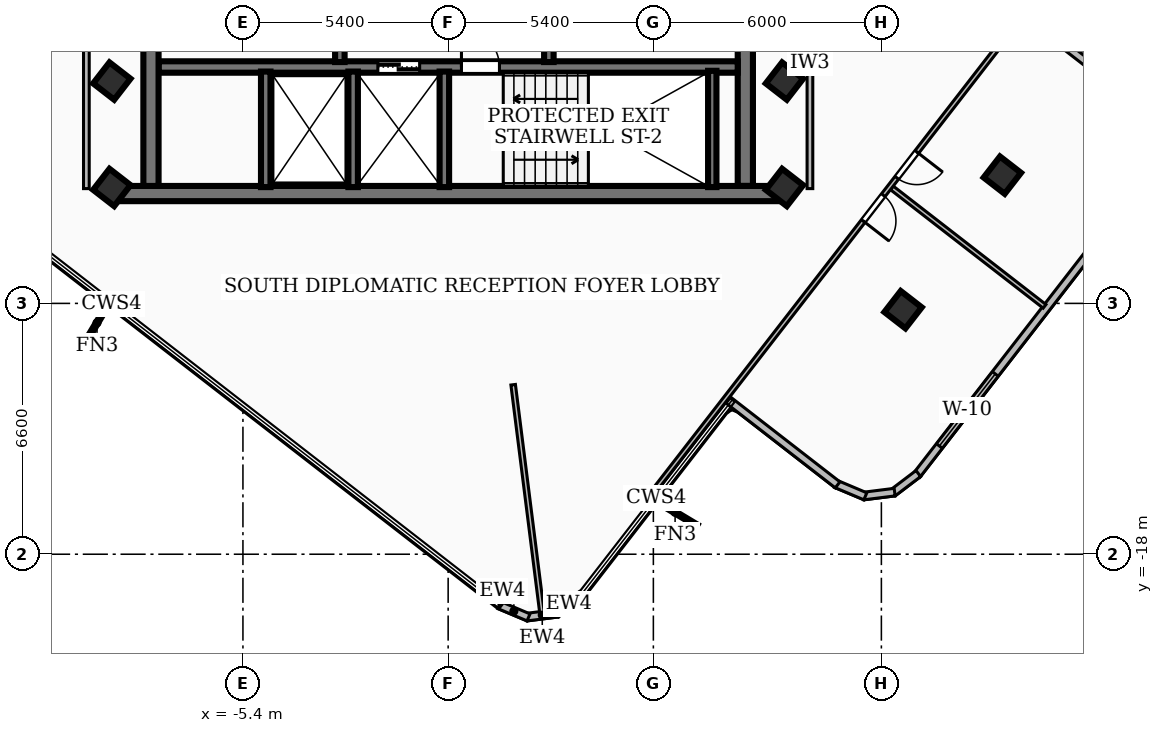
"""IFC4 building model, lengths in metres.
Left out: names, types, materials, properties, quantities, classifications, styles, units other than length and angle.
Written with IfcOpenShell. Run it as: python <this file> out.ifc"""

import sys

from ifc_helpers import new_model, si_unit, direction, frame, frame_2d, origin, origin_2d, place, context, subcontext, project, spatial, rectangle, extrude, element, fill, save


model = new_model("IFC4")
c1 = context("Model", 3, precision=1e-05, world=origin(), true_north=direction((0.0, 1.0)))
c2 = subcontext(c1, "Body", "Model", "MODEL_VIEW")
j1 = project(units=[si_unit("LENGTHUNIT", "METRE"), si_unit("PLANEANGLEUNIT", "RADIAN")], contexts=[c1])
p1 = place(None, origin())
s1 = spatial("IfcSite", under=j1, at=p1, CompositionType="ELEMENT")
p2 = place(p1, origin())
s2 = spatial("IfcBuilding", under=s1, at=p2, CompositionType="ELEMENT")
p3 = place(p2, frame((0.0, 0.0, 257.76)))
s3 = spatial("IfcBuildingStorey", under=s2, at=p3, CompositionType="ELEMENT", Elevation=257.76)
p4 = place(p3, frame((8.78, -8.51, 0.0), z_axis=(0.0, 0.0, 1.0), x_axis=(-1.0, 0.0, 0.0)))
e1 = element("IfcWall", 1, at=p4, inside=s3, PredefinedType="SHEAR", context=c2, shape_type="SweptSolid", body=[
    extrude(rectangle(XDim=17.56, YDim=0.4, at=frame_2d((8.78, 0.0))), origin(), (0.0, 0.0, 1.0), 3.16),
])
for number, where, z_axis, x_axis in (
    (2, (-7.82, -8.31, 0.0), (0.0, 0.0, 1.0), (0.0, 1.0, 0.0)),
    (3, (7.82, -1.95, 0.0), (0.0, 0.0, 1.0), (0.0, -1.0, 0.0)),
):
    element("IfcWall", number, at=place(p3, frame(where, z_axis=z_axis, x_axis=x_axis)), inside=s3, PredefinedType="SHEAR", context=c2, shape_type="SweptSolid", body=[
        extrude(rectangle(XDim=6.36, YDim=0.4, at=frame_2d((3.18, 0.0))), origin(), (0.0, 0.0, 1.0), 3.16),
    ])
p5 = place(p3, frame((-7.62, -5.18, 0.0), z_axis=(0.0, 0.0, 1.0), x_axis=(1.0, 0.0, 0.0)))
e4 = element("IfcWall", 4, at=p5, inside=s3, PredefinedType="SOLIDWALL", context=c2, shape_type="SweptSolid", body=[
    extrude(rectangle(XDim=15.24, YDim=0.3, at=frame_2d((7.62, 0.0))), origin(), (0.0, 0.0, 1.0), 3.16),
])
p6 = place(p5, frame((5.77, 0.0, 0.0)))
e5 = element("IfcOpeningElement", 5, at=p6, cuts=e4, PredefinedType="OPENING", context=c2, shape_type="SweptSolid", body=[
    extrude(rectangle(XDim=1.1, YDim=2.15, at=frame_2d((0.55, 1.075))), frame((0.0, 0.16, 0.0), z_axis=(0.0, -1.0, 0.0), x_axis=(1.0, 0.0, 0.0)), (0.0, 0.0, 1.0), 0.32),
])
p7 = place(p5, frame((7.97, 0.0, 0.0)))
e6 = element("IfcOpeningElement", 6, at=p7, cuts=e4, PredefinedType="OPENING", context=c2, shape_type="SweptSolid", body=[
    extrude(rectangle(XDim=1.0, YDim=2.1, at=frame_2d((0.5, 1.05))), frame((0.0, 0.16, 0.0), z_axis=(0.0, -1.0, 0.0), x_axis=(1.0, 0.0, 0.0)), (0.0, 0.0, 1.0), 0.32),
])
p8 = place(p3, frame((6.95, -8.34, 0.0), z_axis=(0.0, 0.0, 1.0), x_axis=(0.0, 1.0, 0.0)))
e7 = element("IfcWall", 7, at=p8, inside=s3, PredefinedType="SOLIDWALL", context=c2, shape_type="SweptSolid", body=[
    extrude(rectangle(XDim=3.06, YDim=0.22, at=frame_2d((1.53, 0.0))), origin(), (0.0, 0.0, 1.0), 3.16),
])
for number, where, z_axis, x_axis in (
    (8, (-0.1, -8.34, 0.0), (0.0, 0.0, 1.0), (0.0, 1.0, 0.0)),
    (9, (-2.5, -8.34, 0.0), (0.0, 0.0, 1.0), (0.0, 1.0, 0.0)),
    (10, (-4.8, -8.34, 0.0), (0.0, 0.0, 1.0), (0.0, 1.0, 0.0)),
):
    element("IfcWall", number, at=place(p3, frame(where, z_axis=z_axis, x_axis=x_axis)), inside=s3, PredefinedType="SOLIDWALL", context=c2, shape_type="SweptSolid", body=[
        extrude(rectangle(XDim=3.04, YDim=0.25, at=frame_2d((1.52, 0.0))), origin(), (0.0, 0.0, 1.0), 3.16),
    ])
for number, where, z_axis, x_axis in (
    (11, (-2.85, -5.05, 0.0), (0.0, 0.0, 1.0), (0.0, 1.0, 0.0)),
    (12, (2.65, -5.05, 0.0), (0.0, 0.0, 1.0), (0.0, 1.0, 0.0)),
):
    element("IfcWall", number, at=place(p3, frame(where, z_axis=z_axis, x_axis=x_axis)), inside=s3, PredefinedType="SOLIDWALL", context=c2, shape_type="SweptSolid", body=[
        extrude(rectangle(XDim=3.07, YDim=0.25, at=frame_2d((1.535, 0.0))), origin(), (0.0, 0.0, 1.0), 3.16),
    ])
for number, where, z_axis, x_axis in (
    (13, (-8.85, -5.55, 0.0), (0.0, 0.0, 1.0), (0.613, 0.79, 0.0)),
    (14, (8.85, -5.55, 0.0), (0.0, 0.0, 1.0), (0.613, 0.79, 0.0)),
    (15, (8.85, -8.35, 0.0), (0.0, 0.0, 1.0), (0.613, 0.79, 0.0)),
    (16, (-8.85, -8.35, 0.0), (0.0, 0.0, 1.0), (0.613, 0.79, 0.0)),
    (17, (11.971, -11.566, 0.0), (0.0, 0.0, 1.0), (0.613, 0.79, 0.0)),
    (18, (14.583, -8.026, 0.0), (0.0, 0.0, 1.0), (0.613, 0.79, 0.0)),
):
    element("IfcColumn", number, at=place(p3, frame(where, z_axis=z_axis, x_axis=x_axis)), inside=s3, PredefinedType="COLUMN", context=c2, shape_type="SweptSolid", body=[
        extrude(rectangle(XDim=0.7, YDim=0.7, at=origin_2d()), origin(), (0.0, 0.0, 1.0), 3.42),
    ])
p9 = place(p3, frame((3.509, -19.064, 0.0), z_axis=(0.0, 0.0, 1.0), x_axis=(-0.797053904317, -0.603908166539, 0.0)))
e19 = element("IfcWall", 19, at=p9, inside=s3, PredefinedType="SOLIDWALL", context=c2, shape_type="SweptSolid", body=[
    extrude(rectangle(XDim=0.838, YDim=0.2, at=frame_2d((0.419, 0.0))), origin(), (0.0, 0.0, 1.0), 3.16),
])
p10 = place(p3, frame((2.886, -19.552, 0.0), z_axis=(0.0, 0.0, 1.0), x_axis=(-0.992182038023, -0.124799052175, 0.0)))
e20 = element("IfcWall", 20, at=p10, inside=s3, PredefinedType="SOLIDWALL", context=c2, shape_type="SweptSolid", body=[
    extrude(rectangle(XDim=0.825, YDim=0.2, at=frame_2d((0.413, 0.0))), origin(), (0.0, 0.0, 1.0), 3.16),
])
p11 = place(p3, frame((2.115, -19.662, 0.0), z_axis=(0.0, 0.0, 1.0), x_axis=(-0.921569528133, 0.388213349612, 0.0)))
e21 = element("IfcWall", 21, at=p11, inside=s3, PredefinedType="SOLIDWALL", context=c2, shape_type="SweptSolid", body=[
    extrude(rectangle(XDim=0.838, YDim=0.2, at=frame_2d((0.419, 0.0))), origin(), (0.0, 0.0, 1.0), 3.16),
])
p12 = place(p3, frame((15.215, -3.829, 0.0), z_axis=(0.0, 0.0, 1.0), x_axis=(0.790311198889, -0.612705646221, 0.0)))
e22 = element("IfcWall", 22, at=p12, inside=s3, PredefinedType="SOLIDWALL", context=c2, shape_type="SweptSolid", body=[
    extrude(rectangle(XDim=3.643, YDim=0.2, at=frame_2d((1.821, 0.0))), origin(), (0.0, 0.0, 1.0), 3.16),
])
p13 = place(p3, frame((18.357, -8.149, 0.0), z_axis=(0.0, 0.0, 1.0), x_axis=(-0.612797548915, -0.790239940806, 0.0)))
e23 = element("IfcWall", 23, at=p13, inside=s3, PredefinedType="SOLIDWALL", context=c2, shape_type="SweptSolid", body=[
    extrude(rectangle(XDim=9.824, YDim=0.2, at=frame_2d((4.912, 0.0))), origin(), (0.0, 0.0, 1.0), 3.16),
])
p14 = place(p13, frame((6.462, 0.0, 0.85)))
e24 = element("IfcOpeningElement", 24, at=p14, cuts=e23, PredefinedType="OPENING", context=c2, shape_type="SweptSolid", body=[
    extrude(rectangle(XDim=2.4, YDim=1.65, at=frame_2d((1.2, 0.825))), frame((0.0, 0.11, 0.0), z_axis=(0.0, -1.0, 0.0), x_axis=(1.0, 0.0, 0.0)), (0.0, 0.0, 1.0), 0.22),
])
p15 = place(p3, frame((12.372, -15.877, 0.0), z_axis=(0.0, 0.0, 1.0), x_axis=(-0.796493049564, -0.60464768419, 0.0)))
e25 = element("IfcWall", 25, at=p15, inside=s3, PredefinedType="SOLIDWALL", context=c2, shape_type="SweptSolid", body=[
    extrude(rectangle(XDim=0.839, YDim=0.2, at=frame_2d((0.419, 0.0))), origin(), (0.0, 0.0, 1.0), 3.16),
])
p16 = place(p3, frame((11.749, -16.366, 0.0), z_axis=(0.0, 0.0, 1.0), x_axis=(-0.992182038023, -0.124799052175, 0.0)))
e26 = element("IfcWall", 26, at=p16, inside=s3, PredefinedType="SOLIDWALL", context=c2, shape_type="SweptSolid", body=[
    extrude(rectangle(XDim=0.825, YDim=0.2, at=frame_2d((0.413, 0.0))), origin(), (0.0, 0.0, 1.0), 3.16),
])
p17 = place(p3, frame((10.978, -16.476, 0.0), z_axis=(0.0, 0.0, 1.0), x_axis=(-0.921328331513, 0.388785423532, 0.0)))
e27 = element("IfcWall", 27, at=p17, inside=s3, PredefinedType="SOLIDWALL", context=c2, shape_type="SweptSolid", body=[
    extrude(rectangle(XDim=0.839, YDim=0.2, at=frame_2d((0.419, 0.0))), origin(), (0.0, 0.0, 1.0), 3.16),
])
p18 = place(p3, frame((10.248, -16.175, 0.0), z_axis=(0.0, 0.0, 1.0), x_axis=(-0.790239683444, 0.612797880797, 0.0)))
e28 = element("IfcWall", 28, at=p18, inside=s3, PredefinedType="SOLIDWALL", context=c2, shape_type="SweptSolid", body=[
    extrude(rectangle(XDim=3.641, YDim=0.2, at=frame_2d((1.82, 0.0))), origin(), (0.0, 0.0, 1.0), 3.16),
])
p19 = place(p3, frame((-9.52, -8.38, 0.0), z_axis=(0.0, 0.0, 1.0), x_axis=(0.0, 1.0, 0.0)))
e29 = element("IfcWall", 29, at=p19, inside=s3, PredefinedType="PARTITIONING", context=c2, shape_type="SweptSolid", body=[
    extrude(rectangle(XDim=6.63, YDim=0.15, at=frame_2d((3.315, 0.0))), origin(), (0.0, 0.0, 1.0), 3.16),
])
p20 = place(p3, frame((9.52, -8.38, 0.0), z_axis=(0.0, 0.0, 1.0), x_axis=(0.0, 1.0, 0.0)))
e30 = element("IfcWall", 30, at=p20, inside=s3, PredefinedType="PARTITIONING", context=c2, shape_type="SweptSolid", body=[
    extrude(rectangle(XDim=6.63, YDim=0.15, at=frame_2d((3.315, 0.0))), origin(), (0.0, 0.0, 1.0), 2.53),
])
p21 = place(p3, frame((1.711, -13.54, 0.0), z_axis=(0.0, 0.0, 1.0), x_axis=(0.125366398214, -0.992110511082, 0.0)))
e31 = element("IfcWall", 31, at=p21, inside=s3, PredefinedType="PARTITIONING", context=c2, shape_type="SweptSolid", body=[
    extrude(rectangle(XDim=6.047, YDim=0.12, at=frame_2d((3.023, 0.0))), origin(), (0.0, 0.0, 1.0), 3.16),
])
p22 = place(p3, frame((11.676, -8.361, 0.0), z_axis=(0.0, 0.0, 1.0), x_axis=(0.790227868115, -0.612813117071, 0.0)))
e32 = element("IfcWall", 32, at=p22, inside=s3, PredefinedType="PARTITIONING", context=c2, shape_type="SweptSolid", body=[
    extrude(rectangle(XDim=5.085, YDim=0.12, at=frame_2d((2.542, 0.0))), origin(), (0.0, 0.0, 1.0), 3.16),
])
p23 = place(p3, frame((17.555, -0.683, 0.0), z_axis=(0.0, 0.0, 1.0), x_axis=(-0.61291959311, -0.790145285617, 0.0)))
e33 = element("IfcWall", 33, at=p23, inside=s3, PredefinedType="PARTITIONING", context=c2, shape_type="SweptSolid", body=[
    extrude(rectangle(XDim=20.239, YDim=0.12, at=frame_2d((10.12, 0.0))), origin(), (0.0, 0.0, 1.0), 2.53),
])
p24 = place(p23, frame((9.96, 0.0, 0.0)))
e34 = element("IfcOpeningElement", 34, at=p24, cuts=e33, PredefinedType="OPENING", context=c2, shape_type="SweptSolid", body=[
    extrude(rectangle(XDim=0.86, YDim=2.04, at=frame_2d((0.43, 1.02))), frame((0.0, 0.07, 0.0), z_axis=(0.0, -1.0, 0.0), x_axis=(1.0, 0.0, 0.0)), (0.0, 0.0, 1.0), 0.14),
])
p25 = place(p23, frame((8.52, 0.0, 0.0)))
e35 = element("IfcOpeningElement", 35, at=p25, cuts=e33, PredefinedType="OPENING", context=c2, shape_type="SweptSolid", body=[
    extrude(rectangle(XDim=0.86, YDim=2.04, at=frame_2d((0.43, 1.02))), frame((0.0, 0.07, 0.0), z_axis=(0.0, -1.0, 0.0), x_axis=(1.0, 0.0, 0.0)), (0.0, 0.0, 1.0), 0.14),
])
p26 = place(p14, origin())
e36 = element("IfcWindow", 36, at=p26, inside=s3, PartitioningType="SINGLE_PANEL", PredefinedType="WINDOW", context=c2, shape_type="SweptSolid", body=[
    extrude(rectangle(XDim=2.4, YDim=1.65, at=frame_2d((1.2, 0.825))), frame((0.0, 0.03, 0.0), z_axis=(0.0, -1.0, 0.0), x_axis=(1.0, 0.0, 0.0)), (0.0, 0.0, 1.0), 0.06),
])
fill(e24, e36)
p27 = place(p6, origin())
e37 = element("IfcDoor", 37, at=p27, inside=s3, OperationType="DOUBLE_DOOR_SLIDING", PredefinedType="DOOR", context=c2, shape_type="SweptSolid", body=[
    extrude(rectangle(XDim=1.1, YDim=2.15, at=frame_2d((0.55, 1.075))), frame((0.0, 0.025, 0.0), z_axis=(0.0, -1.0, 0.0), x_axis=(1.0, 0.0, 0.0)), (0.0, 0.0, 1.0), 0.05),
])
fill(e5, e37)
p28 = place(p7, origin())
e38 = element("IfcDoor", 38, at=p28, inside=s3, OperationType="SINGLE_SWING_LEFT", PredefinedType="DOOR", context=c2, shape_type="SweptSolid", body=[
    extrude(rectangle(XDim=1.0, YDim=2.1, at=frame_2d((0.5, 1.05))), frame((0.0, 0.025, 0.0), z_axis=(0.0, -1.0, 0.0), x_axis=(1.0, 0.0, 0.0)), (0.0, 0.0, 1.0), 0.05),
])
fill(e6, e38)
p29 = place(p24, origin())
e39 = element("IfcDoor", 39, at=p29, inside=s3, OperationType="SINGLE_SWING_RIGHT", PredefinedType="DOOR", context=c2, shape_type="SweptSolid", body=[
    extrude(rectangle(XDim=0.86, YDim=2.04, at=frame_2d((0.43, 1.02))), frame((0.0, 0.025, 0.0), z_axis=(0.0, -1.0, 0.0), x_axis=(1.0, 0.0, 0.0)), (0.0, 0.0, 1.0), 0.05),
])
fill(e34, e39)
p30 = place(p25, origin())
e40 = element("IfcDoor", 40, at=p30, inside=s3, OperationType="SINGLE_SWING_LEFT", PredefinedType="DOOR", context=c2, shape_type="SweptSolid", body=[
    extrude(rectangle(XDim=0.86, YDim=2.04, at=frame_2d((0.43, 1.02))), frame((0.0, 0.025, 0.0), z_axis=(0.0, -1.0, 0.0), x_axis=(1.0, 0.0, 0.0)), (0.0, 0.0, 1.0), 0.05),
])
fill(e35, e40)
save(model, sys.argv[1])
